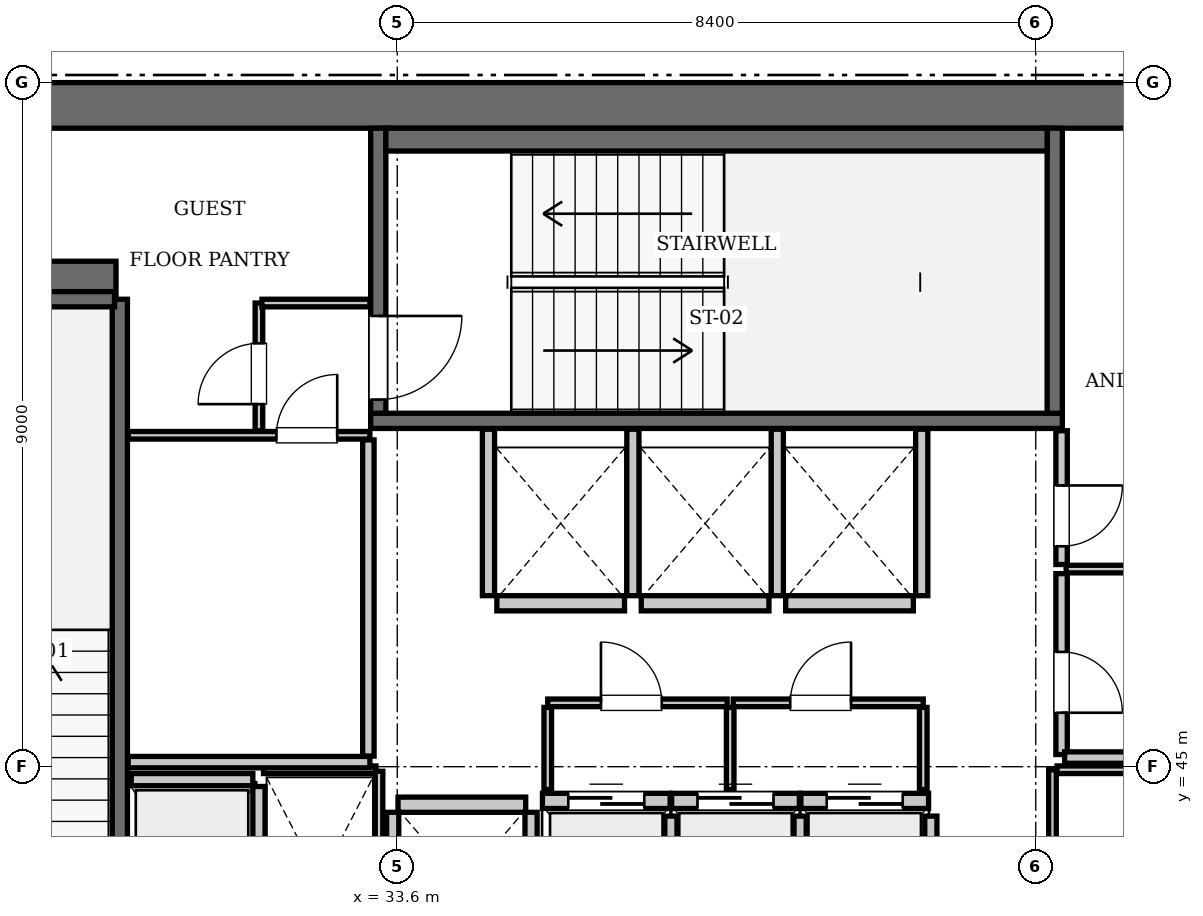
"""IFC4 building model, lengths in metres.
Left out: names, types, materials, properties, quantities, classifications, styles, units other than length and angle.
Written with IfcOpenShell. Run it as: python <this file> out.ifc"""

import sys

from ifc_helpers import new_model, si_unit, direction, frame, frame_2d, origin, place, context, subcontext, project, spatial, rectangle, extrude, element, fill, save


model = new_model("IFC4")
c1 = context("Model", 3, precision=1e-05, world=origin(), true_north=direction((0.0, 1.0)))
c2 = subcontext(c1, "Body", "Model", "MODEL_VIEW")
j1 = project(units=[si_unit("LENGTHUNIT", "METRE"), si_unit("PLANEANGLEUNIT", "RADIAN")], contexts=[c1])
p1 = place(None, origin())
s1 = spatial("IfcSite", under=j1, at=p1, CompositionType="ELEMENT")
p2 = place(p1, origin())
s2 = spatial("IfcBuilding", under=s1, at=p2, CompositionType="ELEMENT")
p3 = place(p2, frame((0.0, 0.0, 243.25)))
s3 = spatial("IfcBuildingStorey", under=s2, at=p3, CompositionType="ELEMENT", Elevation=243.25)
p4 = place(p3, frame((25.2, 53.7, 0.0), z_axis=(0.0, 0.0, 1.0), x_axis=(1.0, 0.0, 0.0)))
e1 = element("IfcWall", 1, at=p4, inside=s3, PredefinedType="SHEAR", context=c2, shape_type="SweptSolid", body=[
    extrude(rectangle(XDim=25.2, YDim=0.6, at=frame_2d((12.6, 0.0))), origin(), (0.0, 0.0, 1.0), 3.85),
])
p5 = place(p3, frame((25.8, 51.4, 0.0), z_axis=(0.0, 0.0, 1.0), x_axis=(1.0, 0.0, 0.0)))
e2 = element("IfcWall", 2, at=p5, inside=s3, PredefinedType="SHEAR", context=c2, shape_type="SweptSolid", body=[
    extrude(rectangle(XDim=4.1, YDim=0.5, at=frame_2d((2.05, 0.0))), origin(), (0.0, 0.0, 1.0), 3.85),
])
p6 = place(p3, frame((29.95, 42.0, 0.0), z_axis=(0.0, 0.0, 1.0), x_axis=(0.0, 1.0, 0.0)))
e3 = element("IfcWall", 3, at=p6, inside=s3, PredefinedType="SOLIDWALL", context=c2, shape_type="SweptSolid", body=[
    extrude(rectangle(XDim=9.15, YDim=0.2, at=frame_2d((4.575, 0.0))), origin(), (0.0, 0.0, 1.0), 3.61),
])
p7 = place(p3, frame((26.38, 51.15, 0.0), z_axis=(0.0, 0.0, 1.0), x_axis=(1.0, 0.0, 0.0)))
e4 = element("IfcWall", 4, at=p7, inside=s3, PredefinedType="SOLIDWALL", context=c2, shape_type="SweptSolid", body=[
    extrude(rectangle(XDim=3.5, YDim=0.2, at=frame_2d((1.75, 0.0))), origin(), (0.0, 0.0, 1.0), 3.61),
])
p8 = place(p3, frame((33.25, 49.55, 0.0), z_axis=(0.0, 0.0, 1.0), x_axis=(1.0, 0.0, 0.0)))
e5 = element("IfcWall", 5, at=p8, inside=s3, PredefinedType="SOLIDWALL", context=c2, shape_type="SweptSolid", body=[
    extrude(rectangle(XDim=9.1, YDim=0.2, at=frame_2d((4.55, 0.0))), origin(), (0.0, 0.0, 1.0), 3.61),
])
p9 = place(p3, frame((42.25, 49.65, 0.0), z_axis=(0.0, 0.0, 1.0), x_axis=(0.0, 1.0, 0.0)))
e6 = element("IfcWall", 6, at=p9, inside=s3, PredefinedType="SOLIDWALL", context=c2, shape_type="SweptSolid", body=[
    extrude(rectangle(XDim=3.75, YDim=0.2, at=frame_2d((1.875, 0.0))), origin(), (0.0, 0.0, 1.0), 3.61),
])
p10 = place(p3, frame((33.35, 49.65, 0.0), z_axis=(0.0, 0.0, 1.0), x_axis=(0.0, 1.0, 0.0)))
e7 = element("IfcWall", 7, at=p10, inside=s3, PredefinedType="SOLIDWALL", context=c2, shape_type="SweptSolid", body=[
    extrude(rectangle(XDim=3.75, YDim=0.2, at=frame_2d((1.875, 0.0))), origin(), (0.0, 0.0, 1.0), 3.61),
])
p11 = place(p10, frame((0.18, 0.0, 0.0)))
e8 = element("IfcOpeningElement", 8, at=p11, cuts=e7, PredefinedType="OPENING", context=c2, shape_type="SweptSolid", body=[
    extrude(rectangle(XDim=1.1, YDim=2.15, at=frame_2d((0.55, 1.075))), frame((0.0, 0.11, 0.0), z_axis=(0.0, -1.0, 0.0), x_axis=(1.0, 0.0, 0.0)), (0.0, 0.0, 1.0), 0.22),
])
p12 = place(p3, frame((33.45, 53.25, 0.0), z_axis=(0.0, 0.0, 1.0), x_axis=(1.0, 0.0, 0.0)))
e9 = element("IfcWall", 9, at=p12, inside=s3, PredefinedType="SOLIDWALL", context=c2, shape_type="SweptSolid", body=[
    extrude(rectangle(XDim=8.7, YDim=0.3, at=frame_2d((4.35, 0.0))), origin(), (0.0, 0.0, 1.0), 3.61),
])
p13 = place(p3, frame((35.51, 44.55, 0.0), z_axis=(0.0, 0.0, 1.0), x_axis=(1.0, 0.0, 0.0)))
e10 = element("IfcWall", 10, at=p13, inside=s3, PredefinedType="SOLIDWALL", context=c2, shape_type="SweptSolid", body=[
    extrude(rectangle(XDim=1.68, YDim=0.2, at=frame_2d((0.84, 0.0))), origin(), (0.0, 0.0, 1.0), 3.61),
])
p14 = place(p13, frame((0.34, 0.0, 0.0)))
e11 = element("IfcOpeningElement", 11, at=p14, cuts=e10, PredefinedType="OPENING", context=c2, shape_type="SweptSolid", body=[
    extrude(rectangle(XDim=1.0, YDim=2.15, at=frame_2d((0.5, 1.075))), frame((0.0, 0.11, 0.0), z_axis=(0.0, -1.0, 0.0), x_axis=(1.0, 0.0, 0.0)), (0.0, 0.0, 1.0), 0.22),
])
p15 = place(p3, frame((37.21, 44.55, 0.0), z_axis=(0.0, 0.0, 1.0), x_axis=(1.0, 0.0, 0.0)))
e12 = element("IfcWall", 12, at=p15, inside=s3, PredefinedType="SOLIDWALL", context=c2, shape_type="SweptSolid", body=[
    extrude(rectangle(XDim=1.68, YDim=0.2, at=frame_2d((0.84, 0.0))), origin(), (0.0, 0.0, 1.0), 3.61),
])
p16 = place(p15, frame((0.34, 0.0, 0.0)))
e13 = element("IfcOpeningElement", 13, at=p16, cuts=e12, PredefinedType="OPENING", context=c2, shape_type="SweptSolid", body=[
    extrude(rectangle(XDim=1.0, YDim=2.15, at=frame_2d((0.5, 1.075))), frame((0.0, 0.11, 0.0), z_axis=(0.0, -1.0, 0.0), x_axis=(1.0, 0.0, 0.0)), (0.0, 0.0, 1.0), 0.22),
])
p17 = place(p3, frame((38.91, 44.55, 0.0), z_axis=(0.0, 0.0, 1.0), x_axis=(1.0, 0.0, 0.0)))
e14 = element("IfcWall", 14, at=p17, inside=s3, PredefinedType="SOLIDWALL", context=c2, shape_type="SweptSolid", body=[
    extrude(rectangle(XDim=1.68, YDim=0.2, at=frame_2d((0.84, 0.0))), origin(), (0.0, 0.0, 1.0), 3.61),
])
p18 = place(p17, frame((0.34, 0.0, 0.0)))
e15 = element("IfcOpeningElement", 15, at=p18, cuts=e14, PredefinedType="OPENING", context=c2, shape_type="SweptSolid", body=[
    extrude(rectangle(XDim=1.0, YDim=2.15, at=frame_2d((0.5, 1.075))), frame((0.0, 0.11, 0.0), z_axis=(0.0, -1.0, 0.0), x_axis=(1.0, 0.0, 0.0)), (0.0, 0.0, 1.0), 0.22),
])
p19 = place(p3, frame((34.91, 47.15, 0.0), z_axis=(0.0, 0.0, 1.0), x_axis=(1.0, 0.0, 0.0)))
e16 = element("IfcWall", 16, at=p19, inside=s3, PredefinedType="SOLIDWALL", context=c2, shape_type="SweptSolid", body=[
    extrude(rectangle(XDim=1.68, YDim=0.2, at=frame_2d((0.84, 0.0))), origin(), (0.0, 0.0, 1.0), 3.61),
])
for number, where, z_axis, x_axis in (
    (17, (36.81, 47.15, 0.0), (0.0, 0.0, 1.0), (1.0, 0.0, 0.0)),
    (18, (38.71, 47.15, 0.0), (0.0, 0.0, 1.0), (1.0, 0.0, 0.0)),
    (19, (33.61, 44.5, 0.0), (0.0, 0.0, 1.0), (1.0, 0.0, 0.0)),
):
    element("IfcWall", number, at=place(p3, frame(where, z_axis=z_axis, x_axis=x_axis)), inside=s3, PredefinedType="SOLIDWALL", context=c2, shape_type="SweptSolid", body=[
        extrude(rectangle(XDim=1.68, YDim=0.2, at=frame_2d((0.84, 0.0))), origin(), (0.0, 0.0, 1.0), 3.61),
    ])
p20 = place(p3, frame((30.1, 44.83, 0.0), z_axis=(0.0, 0.0, 1.0), x_axis=(1.0, 0.0, 0.0)))
e20 = element("IfcWall", 20, at=p20, inside=s3, PredefinedType="SOLIDWALL", context=c2, shape_type="SweptSolid", body=[
    extrude(rectangle(XDim=1.6, YDim=0.16, at=frame_2d((0.8, 0.0))), origin(), (0.0, 0.0, 1.0), 3.61),
])
p21 = place(p3, frame((31.78, 42.0, 0.0), z_axis=(0.0, 0.0, 1.0), x_axis=(0.0, 1.0, 0.0)))
e21 = element("IfcWall", 21, at=p21, inside=s3, PredefinedType="SOLIDWALL", context=c2, shape_type="SweptSolid", body=[
    extrude(rectangle(XDim=2.74, YDim=0.16, at=frame_2d((1.37, 0.0))), origin(), (0.0, 0.0, 1.0), 3.61),
])
for number, where, z_axis, x_axis in (
    (22, (37.2, 42.0, 0.0), (0.0, 0.0, 1.0), (0.0, 1.0, 0.0)),
    (23, (38.9, 42.0, 0.0), (0.0, 0.0, 1.0), (0.0, 1.0, 0.0)),
    (24, (40.62, 42.0, 0.0), (0.0, 0.0, 1.0), (0.0, 1.0, 0.0)),
):
    element("IfcWall", number, at=place(p3, frame(where, z_axis=z_axis, x_axis=x_axis)), inside=s3, PredefinedType="SOLIDWALL", context=c2, shape_type="SweptSolid", body=[
        extrude(rectangle(XDim=2.35, YDim=0.16, at=frame_2d((1.175, 0.0))), origin(), (0.0, 0.0, 1.0), 3.61),
    ])
for number, where, z_axis, x_axis in (
    (25, (34.8, 47.25, 0.0), (0.0, 0.0, 1.0), (0.0, 1.0, 0.0)),
    (26, (36.7, 47.25, 0.0), (0.0, 0.0, 1.0), (0.0, 1.0, 0.0)),
    (27, (38.6, 47.25, 0.0), (0.0, 0.0, 1.0), (0.0, 1.0, 0.0)),
    (28, (40.5, 47.25, 0.0), (0.0, 0.0, 1.0), (0.0, 1.0, 0.0)),
):
    element("IfcWall", number, at=place(p3, frame(where, z_axis=z_axis, x_axis=x_axis)), inside=s3, PredefinedType="SOLIDWALL", context=c2, shape_type="SweptSolid", body=[
        extrude(rectangle(XDim=2.19, YDim=0.16, at=frame_2d((1.095, 0.0))), origin(), (0.0, 0.0, 1.0), 3.61),
    ])
for number, where, z_axis, x_axis in (
    (29, (33.54, 42.0, 0.0), (0.0, 0.0, 1.0), (0.0, 1.0, 0.0)),
    (30, (35.36, 42.0, 0.0), (0.0, 0.0, 1.0), (0.0, 1.0, 0.0)),
):
    element("IfcWall", number, at=place(p3, frame(where, z_axis=z_axis, x_axis=x_axis)), inside=s3, PredefinedType="SOLIDWALL", context=c2, shape_type="SweptSolid", body=[
        extrude(rectangle(XDim=2.4, YDim=0.16, at=frame_2d((1.2, 0.0))), origin(), (0.0, 0.0, 1.0), 3.61),
    ])
p22 = place(p3, frame((31.84, 44.96, 0.0), z_axis=(0.0, 0.0, 1.0), x_axis=(1.0, 0.0, 0.0)))
e31 = element("IfcWall", 31, at=p22, inside=s3, PredefinedType="PARTITIONING", context=c2, shape_type="SweptSolid", body=[
    extrude(rectangle(XDim=1.48, YDim=0.1, at=frame_2d((0.74, 0.0))), origin(), (0.0, 0.0, 1.0), 3.61),
])
p23 = place(p3, frame((33.36, 42.06, 0.0), z_axis=(0.0, 0.0, 1.0), x_axis=(0.0, 1.0, 0.0)))
e32 = element("IfcWall", 32, at=p23, inside=s3, PredefinedType="PARTITIONING", context=c2, shape_type="SweptSolid", body=[
    extrude(rectangle(XDim=2.88, YDim=0.1, at=frame_2d((1.44, 0.0))), origin(), (0.0, 0.0, 1.0), 3.61),
])
p24 = place(p3, frame((35.58, 45.84, 0.0), z_axis=(0.0, 0.0, 1.0), x_axis=(1.0, 0.0, 0.0)))
e33 = element("IfcWall", 33, at=p24, inside=s3, PredefinedType="PARTITIONING", context=c2, shape_type="SweptSolid", body=[
    extrude(rectangle(XDim=2.36, YDim=0.1, at=frame_2d((1.18, 0.0))), origin(), (0.0, 0.0, 1.0), 3.61),
])
p25 = place(p24, frame((0.7, 0.0, 0.0)))
e34 = element("IfcOpeningElement", 34, at=p25, cuts=e33, PredefinedType="OPENING", context=c2, shape_type="SweptSolid", body=[
    extrude(rectangle(XDim=0.8, YDim=2.05, at=frame_2d((0.4, 1.025))), frame((0.0, 0.06, 0.0), z_axis=(0.0, -1.0, 0.0), x_axis=(1.0, 0.0, 0.0)), (0.0, 0.0, 1.0), 0.12),
])
p26 = place(p3, frame((38.02, 45.84, 0.0), z_axis=(0.0, 0.0, 1.0), x_axis=(1.0, 0.0, 0.0)))
e35 = element("IfcWall", 35, at=p26, inside=s3, PredefinedType="PARTITIONING", context=c2, shape_type="SweptSolid", body=[
    extrude(rectangle(XDim=2.5, YDim=0.1, at=frame_2d((1.25, 0.0))), origin(), (0.0, 0.0, 1.0), 3.61),
])
p27 = place(p26, frame((0.75, 0.0, 0.0)))
e36 = element("IfcOpeningElement", 36, at=p27, cuts=e35, PredefinedType="OPENING", context=c2, shape_type="SweptSolid", body=[
    extrude(rectangle(XDim=0.8, YDim=2.05, at=frame_2d((0.4, 1.025))), frame((0.0, 0.06, 0.0), z_axis=(0.0, -1.0, 0.0), x_axis=(1.0, 0.0, 0.0)), (0.0, 0.0, 1.0), 0.12),
])
for number, where, z_axis, x_axis in (
    (37, (35.58, 44.7, 0.0), (0.0, 0.0, 1.0), (0.0, 1.0, 0.0)),
    (38, (37.98, 44.7, 0.0), (0.0, 0.0, 1.0), (0.0, 1.0, 0.0)),
    (39, (40.52, 44.7, 0.0), (0.0, 0.0, 1.0), (0.0, 1.0, 0.0)),
):
    element("IfcWall", number, at=place(p3, frame(where, z_axis=z_axis, x_axis=x_axis)), inside=s3, PredefinedType="PARTITIONING", context=c2, shape_type="SweptSolid", body=[
        extrude(rectangle(XDim=1.08, YDim=0.1, at=frame_2d((0.54, 0.0))), origin(), (0.0, 0.0, 1.0), 3.61),
    ])
p28 = place(p3, frame((42.22, 42.05, 0.0), z_axis=(0.0, 0.0, 1.0), x_axis=(0.0, 1.0, 0.0)))
e40 = element("IfcWall", 40, at=p28, inside=s3, PredefinedType="PARTITIONING", context=c2, shape_type="SweptSolid", body=[
    extrude(rectangle(XDim=2.91, YDim=0.1, at=frame_2d((1.455, 0.0))), origin(), (0.0, 0.0, 1.0), 3.61),
])
p29 = place(p28, frame((0.65, 0.0, 0.0)))
e41 = element("IfcOpeningElement", 41, at=p29, cuts=e40, PredefinedType="OPENING", context=c2, shape_type="SweptSolid", body=[
    extrude(rectangle(XDim=0.8, YDim=2.05, at=frame_2d((0.4, 1.025))), frame((0.0, 0.06, 0.0), z_axis=(0.0, -1.0, 0.0), x_axis=(1.0, 0.0, 0.0)), (0.0, 0.0, 1.0), 0.12),
])
p30 = place(p3, frame((42.28, 44.96, 0.0), z_axis=(0.0, 0.0, 1.0), x_axis=(1.0, 0.0, 0.0)))
e42 = element("IfcWall", 42, at=p30, inside=s3, PredefinedType="PARTITIONING", context=c2, shape_type="SweptSolid", body=[
    extrude(rectangle(XDim=1.3, YDim=0.1, at=frame_2d((0.65, 0.0))), origin(), (0.0, 0.0, 1.0), 3.61),
])
p31 = place(p3, frame((30.06, 45.06, 0.0), z_axis=(0.0, 0.0, 1.0), x_axis=(1.0, 0.0, 0.0)))
e43 = element("IfcWall", 43, at=p31, inside=s3, PredefinedType="PARTITIONING", context=c2, shape_type="SweptSolid", body=[
    extrude(rectangle(XDim=3.18, YDim=0.15, at=frame_2d((1.59, 0.0))), origin(), (0.0, 0.0, 1.0), 3.61),
])
p32 = place(p3, frame((33.22, 45.14, 0.0), z_axis=(0.0, 0.0, 1.0), x_axis=(0.0, 1.0, 0.0)))
e44 = element("IfcWall", 44, at=p32, inside=s3, PredefinedType="PARTITIONING", context=c2, shape_type="SweptSolid", body=[
    extrude(rectangle(XDim=4.16, YDim=0.15, at=frame_2d((2.08, 0.0))), origin(), (0.0, 0.0, 1.0), 3.61),
])
p33 = place(p3, frame((30.06, 49.36, 0.0), z_axis=(0.0, 0.0, 1.0), x_axis=(1.0, 0.0, 0.0)))
e45 = element("IfcWall", 45, at=p33, inside=s3, PredefinedType="PARTITIONING", context=c2, shape_type="SweptSolid", body=[
    extrude(rectangle(XDim=3.18, YDim=0.1, at=frame_2d((1.59, 0.0))), origin(), (0.0, 0.0, 1.0), 3.61),
])
p34 = place(p33, frame((1.95, 0.0, 0.0)))
e46 = element("IfcOpeningElement", 46, at=p34, cuts=e45, PredefinedType="OPENING", context=c2, shape_type="SweptSolid", body=[
    extrude(rectangle(XDim=0.8, YDim=2.05, at=frame_2d((0.4, 1.025))), frame((0.0, 0.06, 0.0), z_axis=(0.0, -1.0, 0.0), x_axis=(1.0, 0.0, 0.0)), (0.0, 0.0, 1.0), 0.12),
])
p35 = place(p3, frame((31.78, 49.42, 0.0), z_axis=(0.0, 0.0, 1.0), x_axis=(0.0, 1.0, 0.0)))
e47 = element("IfcWall", 47, at=p35, inside=s3, PredefinedType="PARTITIONING", context=c2, shape_type="SweptSolid", body=[
    extrude(rectangle(XDim=1.68, YDim=0.1, at=frame_2d((0.84, 0.0))), origin(), (0.0, 0.0, 1.0), 3.61),
])
p36 = place(p35, frame((0.35, 0.0, 0.0)))
e48 = element("IfcOpeningElement", 48, at=p36, cuts=e47, PredefinedType="OPENING", context=c2, shape_type="SweptSolid", body=[
    extrude(rectangle(XDim=0.8, YDim=2.05, at=frame_2d((0.4, 1.025))), frame((0.0, 0.06, 0.0), z_axis=(0.0, -1.0, 0.0), x_axis=(1.0, 0.0, 0.0)), (0.0, 0.0, 1.0), 0.12),
])
p37 = place(p3, frame((31.82, 51.1, 0.0), z_axis=(0.0, 0.0, 1.0), x_axis=(1.0, 0.0, 0.0)))
e49 = element("IfcWall", 49, at=p37, inside=s3, PredefinedType="PARTITIONING", context=c2, shape_type="SweptSolid", body=[
    extrude(rectangle(XDim=1.42, YDim=0.1, at=frame_2d((0.71, 0.0))), origin(), (0.0, 0.0, 1.0), 3.61),
])
p38 = place(p3, frame((42.34, 45.16, 0.0), z_axis=(0.0, 0.0, 1.0), x_axis=(0.0, 1.0, 0.0)))
e50 = element("IfcWall", 50, at=p38, inside=s3, PredefinedType="PARTITIONING", context=c2, shape_type="SweptSolid", body=[
    extrude(rectangle(XDim=2.38, YDim=0.15, at=frame_2d((1.19, 0.0))), origin(), (0.0, 0.0, 1.0), 3.61),
])
p39 = place(p38, frame((0.55, 0.0, 0.0)))
e51 = element("IfcOpeningElement", 51, at=p39, cuts=e50, PredefinedType="OPENING", context=c2, shape_type="SweptSolid", body=[
    extrude(rectangle(XDim=0.8, YDim=2.05, at=frame_2d((0.4, 1.025))), frame((0.0, 0.085, 0.0), z_axis=(0.0, -1.0, 0.0), x_axis=(1.0, 0.0, 0.0)), (0.0, 0.0, 1.0), 0.17),
])
p40 = place(p3, frame((42.34, 47.66, 0.0), z_axis=(0.0, 0.0, 1.0), x_axis=(0.0, 1.0, 0.0)))
e52 = element("IfcWall", 52, at=p40, inside=s3, PredefinedType="PARTITIONING", context=c2, shape_type="SweptSolid", body=[
    extrude(rectangle(XDim=1.76, YDim=0.15, at=frame_2d((0.88, 0.0))), origin(), (0.0, 0.0, 1.0), 3.61),
])
p41 = place(p40, frame((0.24, 0.0, 0.0)))
e53 = element("IfcOpeningElement", 53, at=p41, cuts=e52, PredefinedType="OPENING", context=c2, shape_type="SweptSolid", body=[
    extrude(rectangle(XDim=0.8, YDim=2.05, at=frame_2d((0.4, 1.025))), frame((0.0, 0.085, 0.0), z_axis=(0.0, -1.0, 0.0), x_axis=(1.0, 0.0, 0.0)), (0.0, 0.0, 1.0), 0.17),
])
p42 = place(p3, frame((42.4, 47.6, 0.0), z_axis=(0.0, 0.0, 1.0), x_axis=(1.0, 0.0, 0.0)))
e54 = element("IfcWall", 54, at=p42, inside=s3, PredefinedType="PARTITIONING", context=c2, shape_type="SweptSolid", body=[
    extrude(rectangle(XDim=3.1, YDim=0.1, at=frame_2d((1.55, 0.0))), origin(), (0.0, 0.0, 1.0), 3.61),
])
p43 = place(p3, frame((42.38, 45.12, 0.0), z_axis=(0.0, 0.0, 1.0), x_axis=(1.0, 0.0, 0.0)))
e55 = element("IfcWall", 55, at=p43, inside=s3, PredefinedType="PARTITIONING", context=c2, shape_type="SweptSolid", body=[
    extrude(rectangle(XDim=3.14, YDim=0.15, at=frame_2d((1.57, 0.0))), origin(), (0.0, 0.0, 1.0), 3.61),
])
p44 = place(p11, frame((1.1, 0.0, 0.0), z_axis=(0.0, 0.0, 1.0), x_axis=(-1.0, 0.0, 0.0)))
e56 = element("IfcDoor", 56, at=p44, inside=s3, OperationType="SINGLE_SWING_LEFT", PredefinedType="DOOR", context=c2, shape_type="SweptSolid", body=[
    extrude(rectangle(XDim=1.1, YDim=2.15, at=frame_2d((0.55, 1.075))), frame((0.0, 0.025, 0.0), z_axis=(0.0, -1.0, 0.0), x_axis=(1.0, 0.0, 0.0)), (0.0, 0.0, 1.0), 0.05),
])
fill(e8, e56)
p45 = place(p14, origin())
e57 = element("IfcDoor", 57, at=p45, inside=s3, OperationType="SLIDING_TO_LEFT", PredefinedType="DOOR", context=c2, shape_type="SweptSolid", body=[
    extrude(rectangle(XDim=1.0, YDim=2.15, at=frame_2d((0.5, 1.075))), frame((0.0, 0.025, 0.0), z_axis=(0.0, -1.0, 0.0), x_axis=(1.0, 0.0, 0.0)), (0.0, 0.0, 1.0), 0.05),
])
fill(e11, e57)
p46 = place(p16, origin())
e58 = element("IfcDoor", 58, at=p46, inside=s3, OperationType="SLIDING_TO_LEFT", PredefinedType="DOOR", context=c2, shape_type="SweptSolid", body=[
    extrude(rectangle(XDim=1.0, YDim=2.15, at=frame_2d((0.5, 1.075))), frame((0.0, 0.025, 0.0), z_axis=(0.0, -1.0, 0.0), x_axis=(1.0, 0.0, 0.0)), (0.0, 0.0, 1.0), 0.05),
])
fill(e13, e58)
p47 = place(p18, origin())
e59 = element("IfcDoor", 59, at=p47, inside=s3, OperationType="SLIDING_TO_LEFT", PredefinedType="DOOR", context=c2, shape_type="SweptSolid", body=[
    extrude(rectangle(XDim=1.0, YDim=2.15, at=frame_2d((0.5, 1.075))), frame((0.0, 0.025, 0.0), z_axis=(0.0, -1.0, 0.0), x_axis=(1.0, 0.0, 0.0)), (0.0, 0.0, 1.0), 0.05),
])
fill(e15, e59)
p48 = place(p25, origin())
e60 = element("IfcDoor", 60, at=p48, inside=s3, OperationType="SINGLE_SWING_LEFT", PredefinedType="DOOR", context=c2, shape_type="SweptSolid", body=[
    extrude(rectangle(XDim=0.8, YDim=2.05, at=frame_2d((0.4, 1.025))), frame((0.0, 0.025, 0.0), z_axis=(0.0, -1.0, 0.0), x_axis=(1.0, 0.0, 0.0)), (0.0, 0.0, 1.0), 0.05),
])
fill(e34, e60)
p49 = place(p27, origin())
e61 = element("IfcDoor", 61, at=p49, inside=s3, OperationType="SINGLE_SWING_RIGHT", PredefinedType="DOOR", context=c2, shape_type="SweptSolid", body=[
    extrude(rectangle(XDim=0.8, YDim=2.05, at=frame_2d((0.4, 1.025))), frame((0.0, 0.025, 0.0), z_axis=(0.0, -1.0, 0.0), x_axis=(1.0, 0.0, 0.0)), (0.0, 0.0, 1.0), 0.05),
])
fill(e36, e61)
p50 = place(p34, origin())
e62 = element("IfcDoor", 62, at=p50, inside=s3, OperationType="SINGLE_SWING_RIGHT", PredefinedType="DOOR", context=c2, shape_type="SweptSolid", body=[
    extrude(rectangle(XDim=0.8, YDim=2.05, at=frame_2d((0.4, 1.025))), frame((0.0, 0.025, 0.0), z_axis=(0.0, -1.0, 0.0), x_axis=(1.0, 0.0, 0.0)), (0.0, 0.0, 1.0), 0.05),
])
fill(e46, e62)
p51 = place(p36, origin())
e63 = element("IfcDoor", 63, at=p51, inside=s3, OperationType="SINGLE_SWING_LEFT", PredefinedType="DOOR", context=c2, shape_type="SweptSolid", body=[
    extrude(rectangle(XDim=0.8, YDim=2.05, at=frame_2d((0.4, 1.025))), frame((0.0, 0.025, 0.0), z_axis=(0.0, -1.0, 0.0), x_axis=(1.0, 0.0, 0.0)), (0.0, 0.0, 1.0), 0.05),
])
fill(e48, e63)
p52 = place(p39, frame((0.8, 0.0, 0.0), z_axis=(0.0, 0.0, 1.0), x_axis=(-1.0, 0.0, 0.0)))
e64 = element("IfcDoor", 64, at=p52, inside=s3, OperationType="SINGLE_SWING_RIGHT", PredefinedType="DOOR", context=c2, shape_type="SweptSolid", body=[
    extrude(rectangle(XDim=0.8, YDim=2.05, at=frame_2d((0.4, 1.025))), frame((0.0, 0.025, 0.0), z_axis=(0.0, -1.0, 0.0), x_axis=(1.0, 0.0, 0.0)), (0.0, 0.0, 1.0), 0.05),
])
fill(e51, e64)
p53 = place(p41, frame((0.8, 0.0, 0.0), z_axis=(0.0, 0.0, 1.0), x_axis=(-1.0, 0.0, 0.0)))
e65 = element("IfcDoor", 65, at=p53, inside=s3, OperationType="SINGLE_SWING_LEFT", PredefinedType="DOOR", context=c2, shape_type="SweptSolid", body=[
    extrude(rectangle(XDim=0.8, YDim=2.05, at=frame_2d((0.4, 1.025))), frame((0.0, 0.025, 0.0), z_axis=(0.0, -1.0, 0.0), x_axis=(1.0, 0.0, 0.0)), (0.0, 0.0, 1.0), 0.05),
])
fill(e53, e65)
save(model, sys.argv[1])
